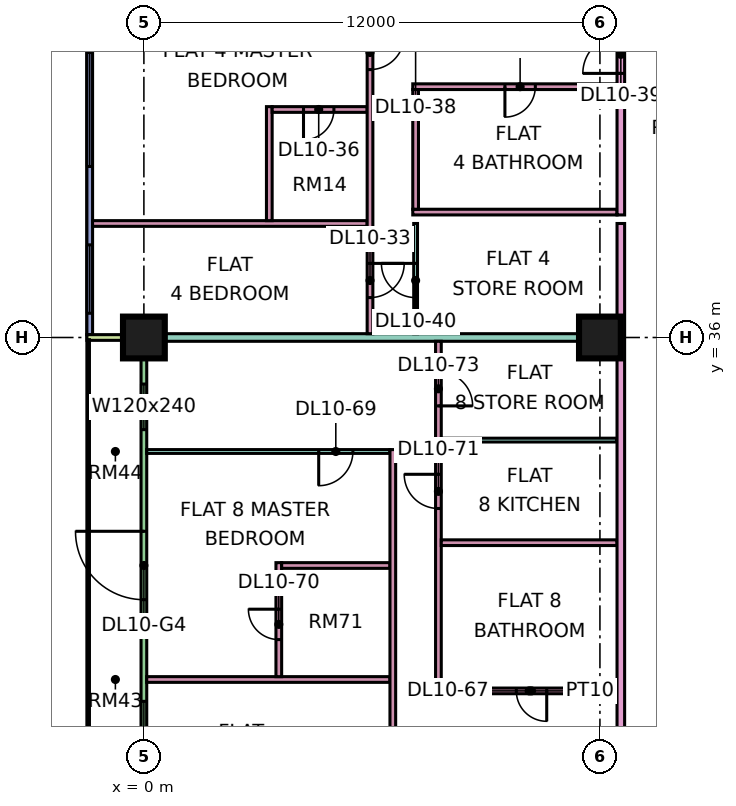
"""IFC4 building model, lengths in metres.
Left out: names, types, materials, properties, quantities, classifications, styles, units other than length and angle.
Written with IfcOpenShell. Run it as: python <this file> out.ifc"""

import sys

from ifc_helpers import new_model, si_unit, direction, frame, frame_2d, origin, origin_2d, place, context, subcontext, project, spatial, rectangle, extrude, element, fill, save


model = new_model("IFC4")
c1 = context("Model", 3, precision=1e-05, world=origin(), true_north=direction((0.0, 1.0)))
c2 = subcontext(c1, "Body", "Model", "MODEL_VIEW")
j1 = project(units=[si_unit("LENGTHUNIT", "METRE"), si_unit("PLANEANGLEUNIT", "RADIAN")], contexts=[c1])
p1 = place(None, origin())
s1 = spatial("IfcSite", under=j1, at=p1, CompositionType="ELEMENT")
p2 = place(p1, origin())
s2 = spatial("IfcBuilding", under=s1, at=p2, CompositionType="ELEMENT")
p3 = place(p2, frame((0.0, 0.0, 52.65)))
s3 = spatial("IfcBuildingStorey", under=s2, at=p3, CompositionType="ELEMENT", Elevation=52.65)
p4 = place(p3, frame((0.0, 36.0, 0.0), z_axis=(0.0, 0.0, 1.0), x_axis=(1.0, 0.0, 0.0)))
e1 = element("IfcColumn", 1, at=p4, inside=s3, PredefinedType="COLUMN", context=c2, shape_type="SweptSolid", body=[
    extrude(rectangle(XDim=1.1, YDim=1.1, at=origin_2d()), origin(), (0.0, 0.0, 1.0), 3.75),
])
p5 = place(p3, frame((12.0, 36.0, 0.0), z_axis=(0.0, 0.0, 1.0), x_axis=(1.0, 0.0, 0.0)))
e2 = element("IfcColumn", 2, at=p5, inside=s3, PredefinedType="COLUMN", context=c2, shape_type="SweptSolid", body=[
    extrude(rectangle(XDim=1.1, YDim=1.1, at=origin_2d()), origin(), (0.0, 0.0, 1.0), 3.75),
])
p6 = place(p3, frame((-1.425, 47.925, 0.0), z_axis=(0.0, 0.0, 1.0), x_axis=(0.0, -1.0, 0.0)))
e3 = element("IfcWall", 3, at=p6, inside=s3, PredefinedType="SOLIDWALL", context=c2, shape_type="SweptSolid", body=[
    extrude(rectangle(XDim=11.85, YDim=0.15, at=frame_2d((5.925, 0.0))), origin(), (0.0, 0.0, 1.0), 3.35),
])
p7 = place(p6, frame((0.562, 0.0, 0.45)))
e4 = element("IfcOpeningElement", 4, at=p7, cuts=e3, PredefinedType="OPENING", context=c2, shape_type="SweptSolid", body=[
    extrude(rectangle(XDim=1.8, YDim=2.4, at=frame_2d((0.9, 1.2))), frame((0.0, 0.085, 0.0), z_axis=(0.0, -1.0, 0.0), x_axis=(1.0, 0.0, 0.0)), (0.0, 0.0, 1.0), 0.17),
])
p8 = place(p6, frame((4.425, 0.0, 0.45)))
e5 = element("IfcOpeningElement", 5, at=p8, cuts=e3, PredefinedType="OPENING", context=c2, shape_type="SweptSolid", body=[
    extrude(rectangle(XDim=3.0, YDim=2.4, at=frame_2d((1.5, 1.2))), frame((0.0, 0.085, 0.0), z_axis=(0.0, -1.0, 0.0), x_axis=(1.0, 0.0, 0.0)), (0.0, 0.0, 1.0), 0.17),
])
p9 = place(p6, frame((9.488, 0.0, 0.45)))
e6 = element("IfcOpeningElement", 6, at=p9, cuts=e3, PredefinedType="OPENING", context=c2, shape_type="SweptSolid", body=[
    extrude(rectangle(XDim=1.8, YDim=2.4, at=frame_2d((0.9, 1.2))), frame((0.0, 0.085, 0.0), z_axis=(0.0, -1.0, 0.0), x_axis=(1.0, 0.0, 0.0)), (0.0, 0.0, 1.0), 0.17),
])
p10 = place(p3, frame((0.0, 35.925, 0.0), z_axis=(0.0, 0.0, 1.0), x_axis=(0.0, -1.0, 0.0)))
e7 = element("IfcWall", 7, at=p10, inside=s3, PredefinedType="SOLIDWALL", context=c2, shape_type="SweptSolid", body=[
    extrude(rectangle(XDim=11.85, YDim=0.15, at=frame_2d((5.925, 0.0))), origin(), (0.0, 0.0, 1.0), 3.35),
])
p11 = place(p10, frame((1.15, 0.0, 0.45)))
e8 = element("IfcOpeningElement", 8, at=p11, cuts=e7, PredefinedType="OPENING", context=c2, shape_type="SweptSolid", body=[
    extrude(rectangle(XDim=1.2, YDim=2.4, at=frame_2d((0.6, 1.2))), frame((0.0, 0.085, 0.0), z_axis=(0.0, -1.0, 0.0), x_axis=(1.0, 0.0, 0.0)), (0.0, 0.0, 1.0), 0.17),
])
p12 = place(p10, frame((5.025, 0.0, 0.0)))
e9 = element("IfcOpeningElement", 9, at=p12, cuts=e7, PredefinedType="OPENING", context=c2, shape_type="SweptSolid", body=[
    extrude(rectangle(XDim=1.8, YDim=2.4, at=frame_2d((0.9, 1.2))), frame((0.0, 0.085, 0.0), z_axis=(0.0, -1.0, 0.0), x_axis=(1.0, 0.0, 0.0)), (0.0, 0.0, 1.0), 0.17),
])
p13 = place(p10, frame((9.5, 0.0, 0.45)))
e10 = element("IfcOpeningElement", 10, at=p13, cuts=e7, PredefinedType="OPENING", context=c2, shape_type="SweptSolid", body=[
    extrude(rectangle(XDim=1.2, YDim=2.4, at=frame_2d((0.6, 1.2))), frame((0.0, 0.085, 0.0), z_axis=(0.0, -1.0, 0.0), x_axis=(1.0, 0.0, 0.0)), (0.0, 0.0, 1.0), 0.17),
])
p14 = place(p3, frame((-1.5, 36.0, 0.0), z_axis=(0.0, 0.0, 1.0), x_axis=(1.0, 0.0, 0.0)))
e11 = element("IfcWall", 11, at=p14, inside=s3, PredefinedType="SOLIDWALL", context=c2, shape_type="SweptSolid", body=[
    extrude(rectangle(XDim=1.5, YDim=0.15, at=frame_2d((0.75, 0.0))), origin(), (0.0, 0.0, 1.0), 3.35),
])
p15 = place(p3, frame((-1.351, 39.0, 0.0), z_axis=(0.0, 0.0, 1.0), x_axis=(1.0, 0.0, 0.0)))
e12 = element("IfcWall", 12, at=p15, inside=s3, PredefinedType="PARTITIONING", context=c2, shape_type="SweptSolid", body=[
    extrude(rectangle(XDim=7.226, YDim=0.15, at=frame_2d((3.613, 0.0))), origin(), (0.0, 0.0, 1.0), 3.35),
])
e13 = element("IfcWall", 13, at=p4, inside=s3, PredefinedType="PARTITIONING", context=c2, shape_type="SweptSolid", body=[
    extrude(rectangle(XDim=12.45, YDim=0.2, at=frame_2d((6.225, 0.0))), origin(), (0.0, 0.0, 1.0), 3.35),
])
p16 = place(p3, frame((0.074, 27.0, 0.0), z_axis=(0.0, 0.0, 1.0), x_axis=(1.0, 0.0, 0.0)))
e14 = element("IfcWall", 14, at=p16, inside=s3, PredefinedType="PARTITIONING", context=c2, shape_type="SweptSolid", body=[
    extrude(rectangle(XDim=6.401, YDim=0.15, at=frame_2d((3.201, 0.0))), origin(), (0.0, 0.0, 1.0), 3.35),
])
p17 = place(p3, frame((0.074, 33.0, 0.0), z_axis=(0.0, 0.0, 1.0), x_axis=(1.0, 0.0, 0.0)))
e15 = element("IfcWall", 15, at=p17, inside=s3, PredefinedType="PARTITIONING", context=c2, shape_type="SweptSolid", body=[
    extrude(rectangle(XDim=6.401, YDim=0.1, at=frame_2d((3.201, 0.0))), origin(), (0.0, 0.0, 1.0), 3.35),
])
p18 = place(p17, frame((4.526, 0.0, 0.0)))
e16 = element("IfcOpeningElement", 16, at=p18, cuts=e15, PredefinedType="OPENING", context=c2, shape_type="SweptSolid", body=[
    extrude(rectangle(XDim=0.9, YDim=2.1, at=frame_2d((0.45, 1.05))), frame((0.0, 0.06, 0.0), z_axis=(0.0, -1.0, 0.0), x_axis=(1.0, 0.0, 0.0)), (0.0, 0.0, 1.0), 0.12),
])
p19 = place(p3, frame((3.3, 39.075, 0.0), z_axis=(0.0, 0.0, 1.0), x_axis=(0.0, 1.0, 0.0)))
e17 = element("IfcWall", 17, at=p19, inside=s3, PredefinedType="PARTITIONING", context=c2, shape_type="SweptSolid", body=[
    extrude(rectangle(XDim=3.0, YDim=0.15, at=frame_2d((1.5, 0.0))), origin(), (0.0, 0.0, 1.0), 3.35),
])
p20 = place(p3, frame((3.375, 42.0, 0.0), z_axis=(0.0, 0.0, 1.0), x_axis=(1.0, 0.0, 0.0)))
e18 = element("IfcWall", 18, at=p20, inside=s3, PredefinedType="PARTITIONING", context=c2, shape_type="SweptSolid", body=[
    extrude(rectangle(XDim=2.5, YDim=0.15, at=frame_2d((1.25, 0.0))), origin(), (0.0, 0.0, 1.0), 3.35),
])
p21 = place(p20, frame((0.825, 0.0, 0.0)))
e19 = element("IfcOpeningElement", 19, at=p21, cuts=e18, PredefinedType="OPENING", context=c2, shape_type="SweptSolid", body=[
    extrude(rectangle(XDim=0.8, YDim=2.1, at=frame_2d((0.4, 1.05))), frame((0.0, 0.085, 0.0), z_axis=(0.0, -1.0, 0.0), x_axis=(1.0, 0.0, 0.0)), (0.0, 0.0, 1.0), 0.17),
])
p22 = place(p3, frame((3.55, 27.075, 0.0), z_axis=(0.0, 0.0, 1.0), x_axis=(0.0, 1.0, 0.0)))
e20 = element("IfcWall", 20, at=p22, inside=s3, PredefinedType="PARTITIONING", context=c2, shape_type="SweptSolid", body=[
    extrude(rectangle(XDim=3.0, YDim=0.15, at=frame_2d((1.5, 0.0))), origin(), (0.0, 0.0, 1.0), 3.35),
])
p23 = place(p22, frame((0.975, 0.0, 0.0)))
e21 = element("IfcOpeningElement", 21, at=p23, cuts=e20, PredefinedType="OPENING", context=c2, shape_type="SweptSolid", body=[
    extrude(rectangle(XDim=0.8, YDim=2.1, at=frame_2d((0.4, 1.05))), frame((0.0, 0.085, 0.0), z_axis=(0.0, -1.0, 0.0), x_axis=(1.0, 0.0, 0.0)), (0.0, 0.0, 1.0), 0.17),
])
p24 = place(p3, frame((3.625, 30.0, 0.0), z_axis=(0.0, 0.0, 1.0), x_axis=(1.0, 0.0, 0.0)))
e22 = element("IfcWall", 22, at=p24, inside=s3, PredefinedType="PARTITIONING", context=c2, shape_type="SweptSolid", body=[
    extrude(rectangle(XDim=2.85, YDim=0.15, at=frame_2d((1.425, 0.0))), origin(), (0.0, 0.0, 1.0), 3.35),
])
p25 = place(p3, frame((5.95, 36.1, 0.0), z_axis=(0.0, 0.0, 1.0), x_axis=(0.0, 1.0, 0.0)))
e23 = element("IfcWall", 23, at=p25, inside=s3, PredefinedType="PARTITIONING", context=c2, shape_type="SweptSolid", body=[
    extrude(rectangle(XDim=8.95, YDim=0.15, at=frame_2d((4.475, 0.0))), origin(), (0.0, 0.0, 1.0), 3.35),
])
p26 = place(p25, frame((0.95, 0.0, 0.0)))
e24 = element("IfcOpeningElement", 24, at=p26, cuts=e23, PredefinedType="OPENING", context=c2, shape_type="SweptSolid", body=[
    extrude(rectangle(XDim=0.9, YDim=2.1, at=frame_2d((0.45, 1.05))), frame((0.0, 0.085, 0.0), z_axis=(0.0, -1.0, 0.0), x_axis=(1.0, 0.0, 0.0)), (0.0, 0.0, 1.0), 0.17),
])
p27 = place(p25, frame((6.95, 0.0, 0.0)))
e25 = element("IfcOpeningElement", 25, at=p27, cuts=e23, PredefinedType="OPENING", context=c2, shape_type="SweptSolid", body=[
    extrude(rectangle(XDim=0.9, YDim=2.1, at=frame_2d((0.45, 1.05))), frame((0.0, 0.085, 0.0), z_axis=(0.0, -1.0, 0.0), x_axis=(1.0, 0.0, 0.0)), (0.0, 0.0, 1.0), 0.17),
])
p28 = place(p3, frame((6.55, 22.5, 0.0), z_axis=(0.0, 0.0, 1.0), x_axis=(0.0, 1.0, 0.0)))
e26 = element("IfcWall", 26, at=p28, inside=s3, PredefinedType="PARTITIONING", context=c2, shape_type="SweptSolid", body=[
    extrude(rectangle(XDim=10.55, YDim=0.15, at=frame_2d((5.275, 0.0))), origin(), (0.0, 0.0, 1.0), 3.35),
])
p29 = place(p28, frame((1.8, 0.0, 0.0)))
e27 = element("IfcOpeningElement", 27, at=p29, cuts=e26, PredefinedType="OPENING", context=c2, shape_type="SweptSolid", body=[
    extrude(rectangle(XDim=0.9, YDim=2.1, at=frame_2d((0.45, 1.05))), frame((0.0, 0.085, 0.0), z_axis=(0.0, -1.0, 0.0), x_axis=(1.0, 0.0, 0.0)), (0.0, 0.0, 1.0), 0.17),
])
p30 = place(p3, frame((7.075, 39.3, 0.0), z_axis=(0.0, 0.0, 1.0), x_axis=(1.0, 0.0, 0.0)))
e28 = element("IfcWall", 28, at=p30, inside=s3, PredefinedType="PARTITIONING", context=c2, shape_type="SweptSolid", body=[
    extrude(rectangle(XDim=5.375, YDim=0.15, at=frame_2d((2.688, 0.0))), origin(), (0.0, 0.0, 1.0), 3.35),
])
p31 = place(p3, frame((7.075, 42.6, 0.0), z_axis=(0.0, 0.0, 1.0), x_axis=(1.0, 0.0, 0.0)))
e29 = element("IfcWall", 29, at=p31, inside=s3, PredefinedType="PARTITIONING", context=c2, shape_type="SweptSolid", body=[
    extrude(rectangle(XDim=5.375, YDim=0.15, at=frame_2d((2.688, 0.0))), origin(), (0.0, 0.0, 1.0), 3.35),
])
p32 = place(p31, frame((2.425, 0.0, 0.0)))
e30 = element("IfcOpeningElement", 30, at=p32, cuts=e29, PredefinedType="OPENING", context=c2, shape_type="SweptSolid", body=[
    extrude(rectangle(XDim=0.8, YDim=2.1, at=frame_2d((0.4, 1.05))), frame((0.0, 0.085, 0.0), z_axis=(0.0, -1.0, 0.0), x_axis=(1.0, 0.0, 0.0)), (0.0, 0.0, 1.0), 0.17),
])
p33 = place(p3, frame((7.15, 36.1, 0.0), z_axis=(0.0, 0.0, 1.0), x_axis=(0.0, 1.0, 0.0)))
e31 = element("IfcWall", 31, at=p33, inside=s3, PredefinedType="PARTITIONING", context=c2, shape_type="SweptSolid", body=[
    extrude(rectangle(XDim=2.9, YDim=0.1, at=frame_2d((1.45, 0.0))), origin(), (0.0, 0.0, 1.0), 3.35),
])
p34 = place(p33, frame((0.95, 0.0, 0.0)))
e32 = element("IfcOpeningElement", 32, at=p34, cuts=e31, PredefinedType="OPENING", context=c2, shape_type="SweptSolid", body=[
    extrude(rectangle(XDim=0.9, YDim=2.1, at=frame_2d((0.45, 1.05))), frame((0.0, 0.06, 0.0), z_axis=(0.0, -1.0, 0.0), x_axis=(1.0, 0.0, 0.0)), (0.0, 0.0, 1.0), 0.12),
])
p35 = place(p3, frame((7.15, 39.375, 0.0), z_axis=(0.0, 0.0, 1.0), x_axis=(0.0, 1.0, 0.0)))
e33 = element("IfcWall", 33, at=p35, inside=s3, PredefinedType="PARTITIONING", context=c2, shape_type="SweptSolid", body=[
    extrude(rectangle(XDim=3.15, YDim=0.15, at=frame_2d((1.575, 0.0))), origin(), (0.0, 0.0, 1.0), 3.35),
])
p36 = place(p3, frame((7.75, 26.625, 0.0), z_axis=(0.0, 0.0, 1.0), x_axis=(0.0, 1.0, 0.0)))
e34 = element("IfcWall", 34, at=p36, inside=s3, PredefinedType="PARTITIONING", context=c2, shape_type="SweptSolid", body=[
    extrude(rectangle(XDim=9.275, YDim=0.15, at=frame_2d((4.637, 0.0))), origin(), (0.0, 0.0, 1.0), 3.35),
])
p37 = place(p36, frame((4.875, 0.0, 0.0)))
e35 = element("IfcOpeningElement", 35, at=p37, cuts=e34, PredefinedType="OPENING", context=c2, shape_type="SweptSolid", body=[
    extrude(rectangle(XDim=0.9, YDim=2.1, at=frame_2d((0.45, 1.05))), frame((0.0, 0.085, 0.0), z_axis=(0.0, -1.0, 0.0), x_axis=(1.0, 0.0, 0.0)), (0.0, 0.0, 1.0), 0.17),
])
p38 = place(p36, frame((7.575, 0.0, 0.0)))
e36 = element("IfcOpeningElement", 36, at=p38, cuts=e34, PredefinedType="OPENING", context=c2, shape_type="SweptSolid", body=[
    extrude(rectangle(XDim=0.9, YDim=2.1, at=frame_2d((0.45, 1.05))), frame((0.0, 0.085, 0.0), z_axis=(0.0, -1.0, 0.0), x_axis=(1.0, 0.0, 0.0)), (0.0, 0.0, 1.0), 0.17),
])
p39 = place(p3, frame((7.825, 26.7, 0.0), z_axis=(0.0, 0.0, 1.0), x_axis=(1.0, 0.0, 0.0)))
e37 = element("IfcWall", 37, at=p39, inside=s3, PredefinedType="PARTITIONING", context=c2, shape_type="SweptSolid", body=[
    extrude(rectangle(XDim=4.625, YDim=0.15, at=frame_2d((2.312, 0.0))), origin(), (0.0, 0.0, 1.0), 3.35),
])
p40 = place(p39, frame((1.975, 0.0, 0.0)))
e38 = element("IfcOpeningElement", 38, at=p40, cuts=e37, PredefinedType="OPENING", context=c2, shape_type="SweptSolid", body=[
    extrude(rectangle(XDim=0.8, YDim=2.1, at=frame_2d((0.4, 1.05))), frame((0.0, 0.085, 0.0), z_axis=(0.0, -1.0, 0.0), x_axis=(1.0, 0.0, 0.0)), (0.0, 0.0, 1.0), 0.17),
])
p41 = place(p3, frame((7.825, 30.6, 0.0), z_axis=(0.0, 0.0, 1.0), x_axis=(1.0, 0.0, 0.0)))
e39 = element("IfcWall", 39, at=p41, inside=s3, PredefinedType="PARTITIONING", context=c2, shape_type="SweptSolid", body=[
    extrude(rectangle(XDim=4.625, YDim=0.15, at=frame_2d((2.312, 0.0))), origin(), (0.0, 0.0, 1.0), 3.35),
])
p42 = place(p3, frame((7.825, 33.3, 0.0), z_axis=(0.0, 0.0, 1.0), x_axis=(1.0, 0.0, 0.0)))
e40 = element("IfcWall", 40, at=p42, inside=s3, PredefinedType="PARTITIONING", context=c2, shape_type="SweptSolid", body=[
    extrude(rectangle(XDim=4.625, YDim=0.1, at=frame_2d((2.312, 0.0))), origin(), (0.0, 0.0, 1.0), 3.35),
])
p43 = place(p3, frame((12.55, 20.0, 0.0), z_axis=(0.0, 0.0, 1.0), x_axis=(0.0, 1.0, 0.0)))
e41 = element("IfcWall", 41, at=p43, inside=s3, PredefinedType="PARTITIONING", context=c2, shape_type="SweptSolid", body=[
    extrude(rectangle(XDim=19.0, YDim=0.2, at=frame_2d((9.5, 0.0))), origin(), (0.0, 0.0, 1.0), 3.35),
])
p44 = place(p43, frame((0.6, 0.0, 0.0)))
e42 = element("IfcOpeningElement", 42, at=p44, cuts=e41, PredefinedType="OPENING", context=c2, shape_type="SweptSolid", body=[
    extrude(rectangle(XDim=1.2, YDim=2.1, at=frame_2d((0.6, 1.05))), frame((0.0, 0.11, 0.0), z_axis=(0.0, -1.0, 0.0), x_axis=(1.0, 0.0, 0.0)), (0.0, 0.0, 1.0), 0.22),
])
p45 = place(p43, frame((4.65, 0.0, 0.0)))
e43 = element("IfcOpeningElement", 43, at=p45, cuts=e41, PredefinedType="OPENING", context=c2, shape_type="SweptSolid", body=[
    extrude(rectangle(XDim=1.0, YDim=2.1, at=frame_2d((0.5, 1.05))), frame((0.0, 0.11, 0.0), z_axis=(0.0, -1.0, 0.0), x_axis=(1.0, 0.0, 0.0)), (0.0, 0.0, 1.0), 0.22),
])
p46 = place(p3, frame((12.55, 39.225, 0.0), z_axis=(0.0, 0.0, 1.0), x_axis=(0.0, 1.0, 0.0)))
e44 = element("IfcWall", 44, at=p46, inside=s3, PredefinedType="PARTITIONING", context=c2, shape_type="SweptSolid", body=[
    extrude(rectangle(XDim=23.775, YDim=0.2, at=frame_2d((11.887, 0.0))), origin(), (0.0, 0.0, 1.0), 3.35),
])
p47 = place(p46, frame((3.725, 0.0, 0.0)))
e45 = element("IfcOpeningElement", 45, at=p47, cuts=e44, PredefinedType="OPENING", context=c2, shape_type="SweptSolid", body=[
    extrude(rectangle(XDim=1.0, YDim=2.1, at=frame_2d((0.5, 1.05))), frame((0.0, 0.11, 0.0), z_axis=(0.0, -1.0, 0.0), x_axis=(1.0, 0.0, 0.0)), (0.0, 0.0, 1.0), 0.22),
])
p48 = place(p46, frame((21.725, 0.0, 0.0)))
e46 = element("IfcOpeningElement", 46, at=p48, cuts=e44, PredefinedType="OPENING", context=c2, shape_type="SweptSolid", body=[
    extrude(rectangle(XDim=1.0, YDim=2.1, at=frame_2d((0.5, 1.05))), frame((0.0, 0.11, 0.0), z_axis=(0.0, -1.0, 0.0), x_axis=(1.0, 0.0, 0.0)), (0.0, 0.0, 1.0), 0.22),
])
p49 = place(p8, origin())
e47 = element("IfcWindow", 47, at=p49, inside=s3, PartitioningType="SINGLE_PANEL", PredefinedType="WINDOW", context=c2, shape_type="SweptSolid", body=[
    extrude(rectangle(XDim=3.0, YDim=2.4, at=frame_2d((1.5, 1.2))), frame((0.0, 0.03, 0.0), z_axis=(0.0, -1.0, 0.0), x_axis=(1.0, 0.0, 0.0)), (0.0, 0.0, 1.0), 0.06),
])
fill(e5, e47)
p50 = place(p9, origin())
e48 = element("IfcWindow", 48, at=p50, inside=s3, PartitioningType="SINGLE_PANEL", PredefinedType="WINDOW", context=c2, shape_type="SweptSolid", body=[
    extrude(rectangle(XDim=1.8, YDim=2.4, at=frame_2d((0.9, 1.2))), frame((0.0, 0.03, 0.0), z_axis=(0.0, -1.0, 0.0), x_axis=(1.0, 0.0, 0.0)), (0.0, 0.0, 1.0), 0.06),
])
fill(e6, e48)
p51 = place(p11, origin())
e49 = element("IfcWindow", 49, at=p51, inside=s3, PartitioningType="SINGLE_PANEL", PredefinedType="WINDOW", context=c2, shape_type="SweptSolid", body=[
    extrude(rectangle(XDim=1.2, YDim=2.4, at=frame_2d((0.6, 1.2))), frame((0.0, 0.03, 0.0), z_axis=(0.0, -1.0, 0.0), x_axis=(1.0, 0.0, 0.0)), (0.0, 0.0, 1.0), 0.06),
])
fill(e8, e49)
p52 = place(p12, frame((1.8, 0.0, 0.0), z_axis=(0.0, 0.0, 1.0), x_axis=(-1.0, 0.0, 0.0)))
e50 = element("IfcDoor", 50, at=p52, inside=s3, OperationType="DOUBLE_DOOR_SINGLE_SWING", PredefinedType="DOOR", context=c2, shape_type="SweptSolid", body=[
    extrude(rectangle(XDim=1.8, YDim=2.4, at=frame_2d((0.9, 1.2))), frame((0.0, 0.025, 0.0), z_axis=(0.0, -1.0, 0.0), x_axis=(1.0, 0.0, 0.0)), (0.0, 0.0, 1.0), 0.05),
])
fill(e9, e50)
p53 = place(p13, origin())
e51 = element("IfcWindow", 51, at=p53, inside=s3, PartitioningType="SINGLE_PANEL", PredefinedType="WINDOW", context=c2, shape_type="SweptSolid", body=[
    extrude(rectangle(XDim=1.2, YDim=2.4, at=frame_2d((0.6, 1.2))), frame((0.0, 0.03, 0.0), z_axis=(0.0, -1.0, 0.0), x_axis=(1.0, 0.0, 0.0)), (0.0, 0.0, 1.0), 0.06),
])
fill(e10, e51)
p54 = place(p32, frame((0.8, 0.0, 0.0), z_axis=(0.0, 0.0, 1.0), x_axis=(-1.0, 0.0, 0.0)))
e52 = element("IfcDoor", 52, at=p54, inside=s3, OperationType="SINGLE_SWING_LEFT", PredefinedType="DOOR", context=c2, shape_type="SweptSolid", body=[
    extrude(rectangle(XDim=0.8, YDim=2.1, at=frame_2d((0.4, 1.05))), frame((0.0, 0.025, 0.0), z_axis=(0.0, -1.0, 0.0), x_axis=(1.0, 0.0, 0.0)), (0.0, 0.0, 1.0), 0.05),
])
fill(e30, e52)
p55 = place(p26, origin())
e53 = element("IfcDoor", 53, at=p55, inside=s3, OperationType="SINGLE_SWING_RIGHT", PredefinedType="DOOR", context=c2, shape_type="SweptSolid", body=[
    extrude(rectangle(XDim=0.9, YDim=2.1, at=frame_2d((0.45, 1.05))), frame((0.0, 0.025, 0.0), z_axis=(0.0, -1.0, 0.0), x_axis=(1.0, 0.0, 0.0)), (0.0, 0.0, 1.0), 0.05),
])
fill(e24, e53)
p56 = place(p27, origin())
e54 = element("IfcDoor", 54, at=p56, inside=s3, OperationType="SINGLE_SWING_RIGHT", PredefinedType="DOOR", context=c2, shape_type="SweptSolid", body=[
    extrude(rectangle(XDim=0.9, YDim=2.1, at=frame_2d((0.45, 1.05))), frame((0.0, 0.025, 0.0), z_axis=(0.0, -1.0, 0.0), x_axis=(1.0, 0.0, 0.0)), (0.0, 0.0, 1.0), 0.05),
])
fill(e25, e54)
p57 = place(p21, frame((0.8, 0.0, 0.0), z_axis=(0.0, 0.0, 1.0), x_axis=(-1.0, 0.0, 0.0)))
e55 = element("IfcDoor", 55, at=p57, inside=s3, OperationType="SINGLE_SWING_LEFT", PredefinedType="DOOR", context=c2, shape_type="SweptSolid", body=[
    extrude(rectangle(XDim=0.8, YDim=2.1, at=frame_2d((0.4, 1.05))), frame((0.0, 0.025, 0.0), z_axis=(0.0, -1.0, 0.0), x_axis=(1.0, 0.0, 0.0)), (0.0, 0.0, 1.0), 0.05),
])
fill(e19, e55)
p58 = place(p47, origin())
e56 = element("IfcDoor", 56, at=p58, inside=s3, OperationType="SINGLE_SWING_LEFT", PredefinedType="DOOR", context=c2, shape_type="SweptSolid", body=[
    extrude(rectangle(XDim=1.0, YDim=2.1, at=frame_2d((0.5, 1.05))), frame((0.0, 0.025, 0.0), z_axis=(0.0, -1.0, 0.0), x_axis=(1.0, 0.0, 0.0)), (0.0, 0.0, 1.0), 0.05),
])
fill(e45, e56)
p59 = place(p34, frame((0.9, 0.0, 0.0), z_axis=(0.0, 0.0, 1.0), x_axis=(-1.0, 0.0, 0.0)))
e57 = element("IfcDoor", 57, at=p59, inside=s3, OperationType="SINGLE_SWING_RIGHT", PredefinedType="DOOR", context=c2, shape_type="SweptSolid", body=[
    extrude(rectangle(XDim=0.9, YDim=2.1, at=frame_2d((0.45, 1.05))), frame((0.0, 0.025, 0.0), z_axis=(0.0, -1.0, 0.0), x_axis=(1.0, 0.0, 0.0)), (0.0, 0.0, 1.0), 0.05),
])
fill(e32, e57)
p60 = place(p40, origin())
e58 = element("IfcDoor", 58, at=p60, inside=s3, OperationType="SINGLE_SWING_RIGHT", PredefinedType="DOOR", context=c2, shape_type="SweptSolid", body=[
    extrude(rectangle(XDim=0.8, YDim=2.1, at=frame_2d((0.4, 1.05))), frame((0.0, 0.025, 0.0), z_axis=(0.0, -1.0, 0.0), x_axis=(1.0, 0.0, 0.0)), (0.0, 0.0, 1.0), 0.05),
])
fill(e38, e58)
p61 = place(p18, frame((0.9, 0.0, 0.0), z_axis=(0.0, 0.0, 1.0), x_axis=(-1.0, 0.0, 0.0)))
e59 = element("IfcDoor", 59, at=p61, inside=s3, OperationType="SINGLE_SWING_LEFT", PredefinedType="DOOR", context=c2, shape_type="SweptSolid", body=[
    extrude(rectangle(XDim=0.9, YDim=2.1, at=frame_2d((0.45, 1.05))), frame((0.0, 0.025, 0.0), z_axis=(0.0, -1.0, 0.0), x_axis=(1.0, 0.0, 0.0)), (0.0, 0.0, 1.0), 0.05),
])
fill(e16, e59)
p62 = place(p23, frame((0.8, 0.0, 0.0), z_axis=(0.0, 0.0, 1.0), x_axis=(-1.0, 0.0, 0.0)))
e60 = element("IfcDoor", 60, at=p62, inside=s3, OperationType="SINGLE_SWING_RIGHT", PredefinedType="DOOR", context=c2, shape_type="SweptSolid", body=[
    extrude(rectangle(XDim=0.8, YDim=2.1, at=frame_2d((0.4, 1.05))), frame((0.0, 0.025, 0.0), z_axis=(0.0, -1.0, 0.0), x_axis=(1.0, 0.0, 0.0)), (0.0, 0.0, 1.0), 0.05),
])
fill(e21, e60)
p63 = place(p37, frame((0.9, 0.0, 0.0), z_axis=(0.0, 0.0, 1.0), x_axis=(-1.0, 0.0, 0.0)))
e61 = element("IfcDoor", 61, at=p63, inside=s3, OperationType="SINGLE_SWING_RIGHT", PredefinedType="DOOR", context=c2, shape_type="SweptSolid", body=[
    extrude(rectangle(XDim=0.9, YDim=2.1, at=frame_2d((0.45, 1.05))), frame((0.0, 0.025, 0.0), z_axis=(0.0, -1.0, 0.0), x_axis=(1.0, 0.0, 0.0)), (0.0, 0.0, 1.0), 0.05),
])
fill(e35, e61)
p64 = place(p38, frame((0.9, 0.0, 0.0), z_axis=(0.0, 0.0, 1.0), x_axis=(-1.0, 0.0, 0.0)))
e62 = element("IfcDoor", 62, at=p64, inside=s3, OperationType="SINGLE_SWING_LEFT", PredefinedType="DOOR", context=c2, shape_type="SweptSolid", body=[
    extrude(rectangle(XDim=0.9, YDim=2.1, at=frame_2d((0.45, 1.05))), frame((0.0, 0.025, 0.0), z_axis=(0.0, -1.0, 0.0), x_axis=(1.0, 0.0, 0.0)), (0.0, 0.0, 1.0), 0.05),
])
fill(e36, e62)
save(model, sys.argv[1])
